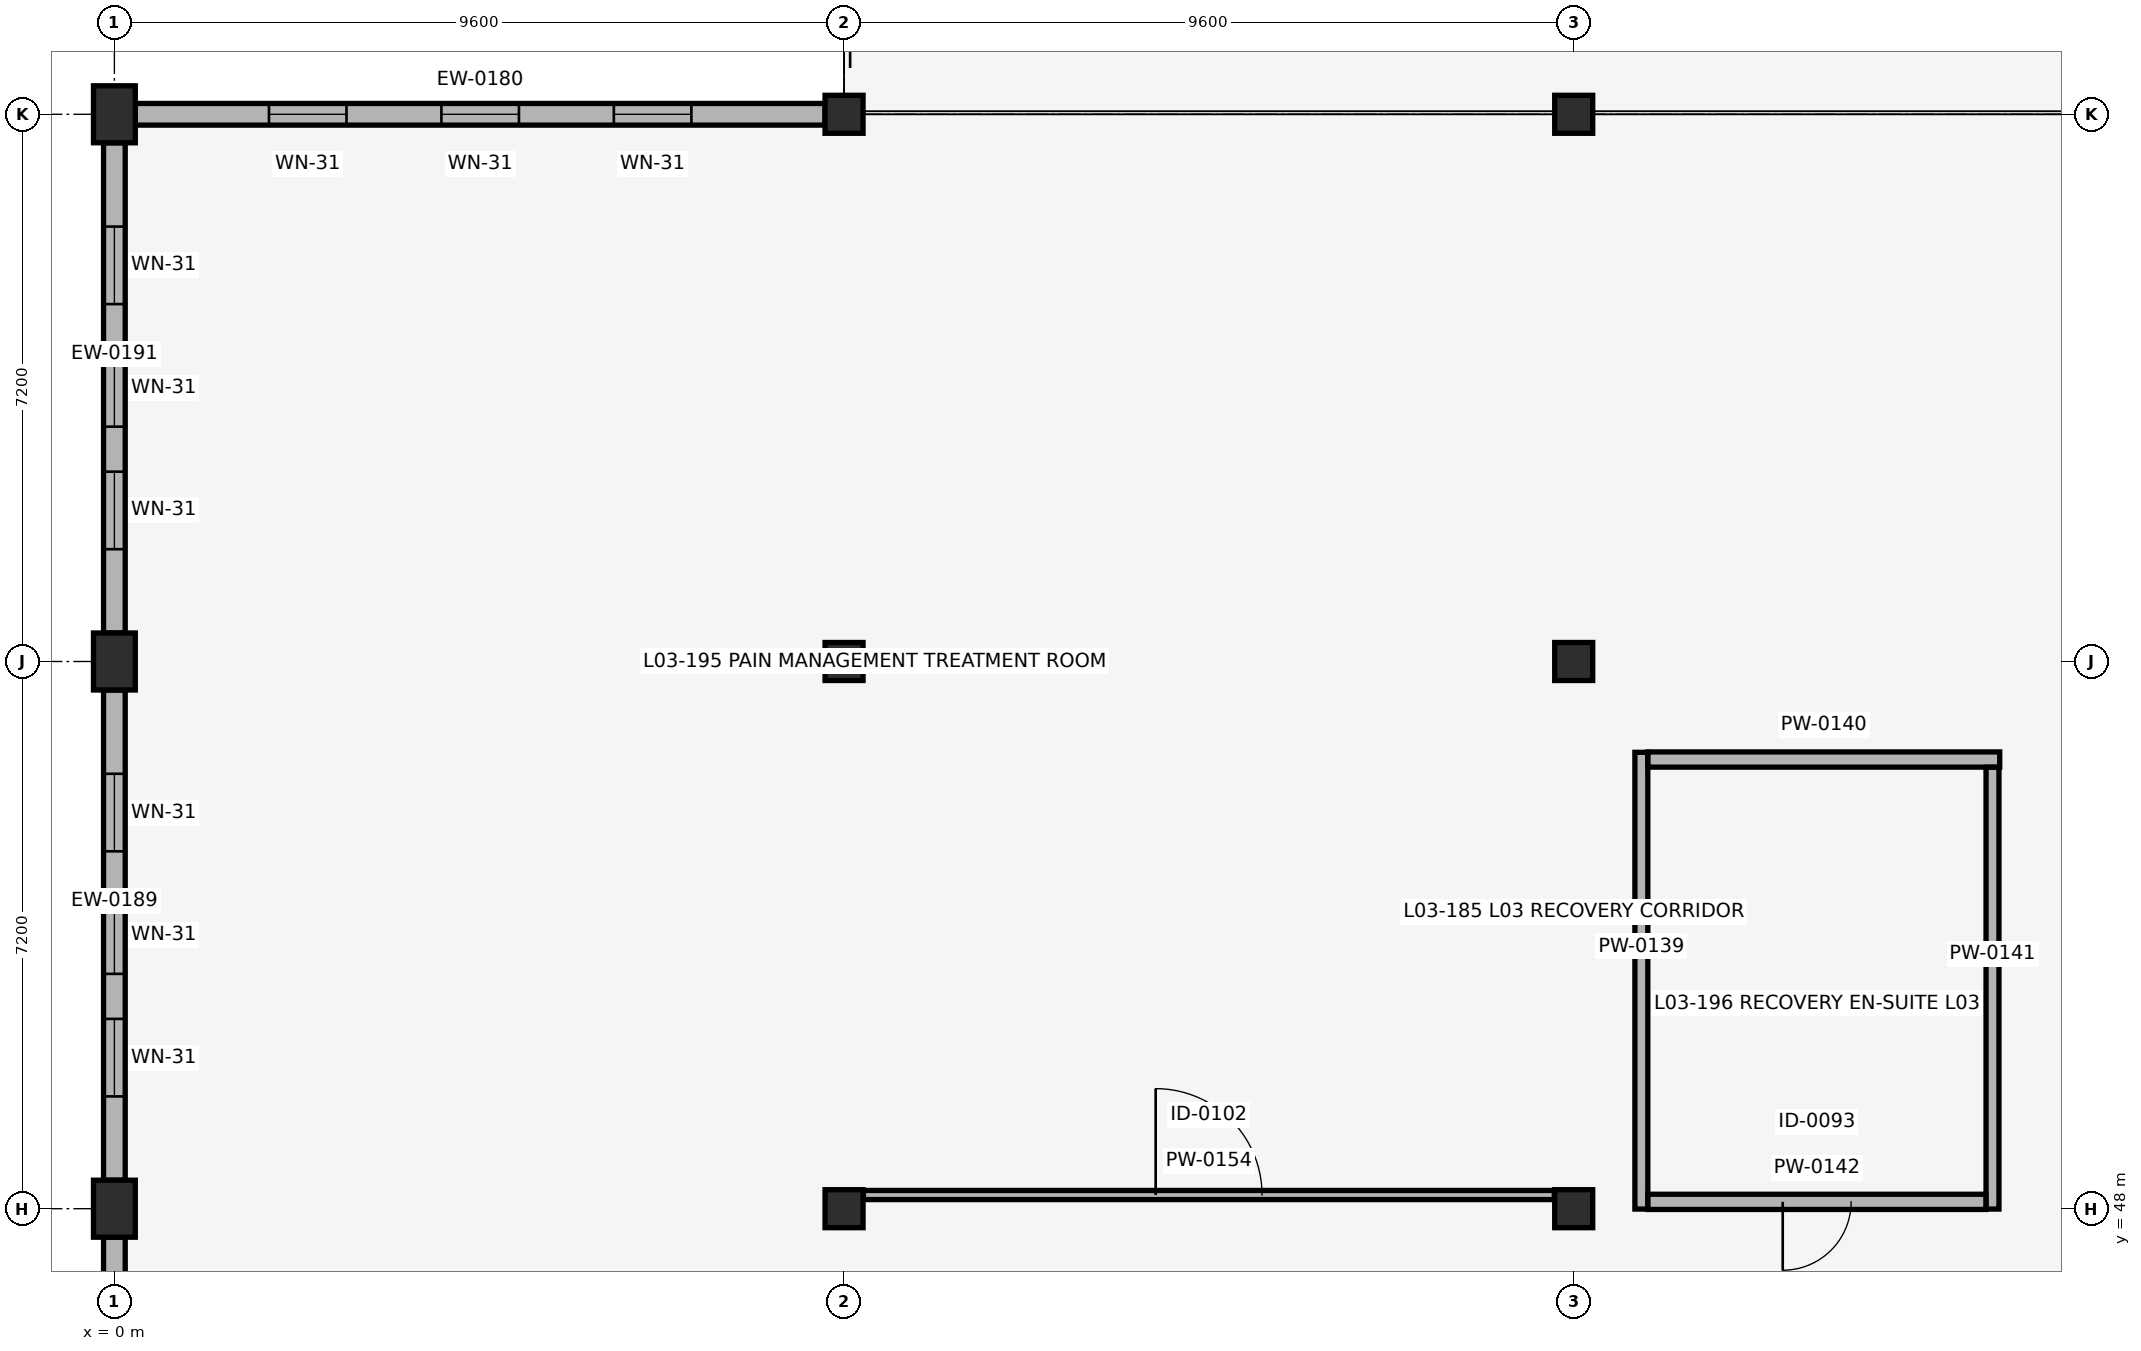
"""IFC4 building model, lengths in metres.
Left out: names, types, materials, properties, quantities, classifications, styles, units other than length and angle.
Written with IfcOpenShell. Run it as: python <this file> out.ifc"""

import sys

from ifc_helpers import new_model, si_unit, direction, frame, frame_2d, origin, origin_2d, place, context, subcontext, project, spatial, rectangle, extrude, element, fill, save


model = new_model("IFC4")
c1 = context("Model", 3, precision=1e-05, world=origin(), true_north=direction((0.0, 1.0)))
c2 = subcontext(c1, "Body", "Model", "MODEL_VIEW")
j1 = project(units=[si_unit("LENGTHUNIT", "METRE"), si_unit("PLANEANGLEUNIT", "RADIAN")], contexts=[c1])
p1 = place(None, origin())
s1 = spatial("IfcSite", under=j1, at=p1, CompositionType="ELEMENT")
p2 = place(p1, origin())
s2 = spatial("IfcBuilding", under=s1, at=p2, CompositionType="ELEMENT")
p3 = place(p2, frame((0.0, 0.0, 12.58)))
s3 = spatial("IfcBuildingStorey", under=s2, at=p3, CompositionType="ELEMENT", Elevation=12.58)
for number, where, z_axis, x_axis in (
    (1, (0.0, 48.0, 0.0), (0.0, 0.0, 1.0), (1.0, 0.0, 0.0)),
    (2, (0.0, 55.2, 0.0), (0.0, 0.0, 1.0), (1.0, 0.0, 0.0)),
    (3, (0.0, 62.4, 0.0), (0.0, 0.0, 1.0), (1.0, 0.0, 0.0)),
):
    element("IfcColumn", number, at=place(p3, frame(where, z_axis=z_axis, x_axis=x_axis)), inside=s3, PredefinedType="COLUMN", context=c2, shape_type="SweptSolid", body=[
        extrude(rectangle(XDim=0.55, YDim=0.75, at=origin_2d()), origin(), (0.0, 0.0, 1.0), 4.08),
    ])
for number, where, z_axis, x_axis in (
    (4, (9.6, 48.0, 0.0), (0.0, 0.0, 1.0), (1.0, 0.0, 0.0)),
    (5, (9.6, 55.2, 0.0), (0.0, 0.0, 1.0), (1.0, 0.0, 0.0)),
    (6, (9.6, 62.4, 0.0), (0.0, 0.0, 1.0), (1.0, 0.0, 0.0)),
    (7, (19.2, 48.0, 0.0), (0.0, 0.0, 1.0), (1.0, 0.0, 0.0)),
    (8, (19.2, 55.2, 0.0), (0.0, 0.0, 1.0), (1.0, 0.0, 0.0)),
    (9, (19.2, 62.4, 0.0), (0.0, 0.0, 1.0), (1.0, 0.0, 0.0)),
):
    element("IfcColumn", number, at=place(p3, frame(where, z_axis=z_axis, x_axis=x_axis)), inside=s3, PredefinedType="COLUMN", context=c2, shape_type="SweptSolid", body=[
        extrude(rectangle(XDim=0.5, YDim=0.5, at=origin_2d()), origin(), (0.0, 0.0, 1.0), 4.08),
    ])
p4 = place(p3, frame((9.35, 62.4, 0.0), z_axis=(0.0, 0.0, 1.0), x_axis=(-1.0, 0.0, 0.0)))
e10 = element("IfcWall", 10, at=p4, inside=s3, PredefinedType="SOLIDWALL", context=c2, shape_type="SweptSolid", body=[
    extrude(rectangle(XDim=9.075, YDim=0.285, at=frame_2d((4.538, 0.0))), origin(), (0.0, 0.0, 1.0), 3.06),
])
p5 = place(p4, frame((1.759, 0.0, 0.88)))
e11 = element("IfcOpeningElement", 11, at=p5, cuts=e10, PredefinedType="OPENING", context=c2, shape_type="SweptSolid", body=[
    extrude(rectangle(XDim=1.02, YDim=1.88, at=frame_2d((0.51, 0.94))), frame((0.0, 0.152, 0.0), z_axis=(0.0, -1.0, 0.0), x_axis=(1.0, 0.0, 0.0)), (0.0, 0.0, 1.0), 0.305),
])
p6 = place(p4, frame((4.028, 0.0, 0.88)))
e12 = element("IfcOpeningElement", 12, at=p6, cuts=e10, PredefinedType="OPENING", context=c2, shape_type="SweptSolid", body=[
    extrude(rectangle(XDim=1.02, YDim=1.88, at=frame_2d((0.51, 0.94))), frame((0.0, 0.152, 0.0), z_axis=(0.0, -1.0, 0.0), x_axis=(1.0, 0.0, 0.0)), (0.0, 0.0, 1.0), 0.305),
])
p7 = place(p4, frame((6.296, 0.0, 0.88)))
e13 = element("IfcOpeningElement", 13, at=p7, cuts=e10, PredefinedType="OPENING", context=c2, shape_type="SweptSolid", body=[
    extrude(rectangle(XDim=1.02, YDim=1.88, at=frame_2d((0.51, 0.94))), frame((0.0, 0.152, 0.0), z_axis=(0.0, -1.0, 0.0), x_axis=(1.0, 0.0, 0.0)), (0.0, 0.0, 1.0), 0.305),
])
p8 = place(p3, frame((0.0, 47.625, 0.0), z_axis=(0.0, 0.0, 1.0), x_axis=(0.0, -1.0, 0.0)))
e14 = element("IfcWall", 14, at=p8, inside=s3, PredefinedType="SOLIDWALL", context=c2, shape_type="SweptSolid", body=[
    extrude(rectangle(XDim=6.45, YDim=0.285, at=frame_2d((3.225, 0.0))), origin(), (0.0, 0.0, 1.0), 3.06),
])
p9 = place(p8, frame((1.103, 0.0, 0.88)))
e15 = element("IfcOpeningElement", 15, at=p9, cuts=e14, PredefinedType="OPENING", context=c2, shape_type="SweptSolid", body=[
    extrude(rectangle(XDim=1.02, YDim=1.88, at=frame_2d((0.51, 0.94))), frame((0.0, 0.152, 0.0), z_axis=(0.0, -1.0, 0.0), x_axis=(1.0, 0.0, 0.0)), (0.0, 0.0, 1.0), 0.305),
])
p10 = place(p8, frame((2.715, 0.0, 0.88)))
e16 = element("IfcOpeningElement", 16, at=p10, cuts=e14, PredefinedType="OPENING", context=c2, shape_type="SweptSolid", body=[
    extrude(rectangle(XDim=1.02, YDim=1.88, at=frame_2d((0.51, 0.94))), frame((0.0, 0.152, 0.0), z_axis=(0.0, -1.0, 0.0), x_axis=(1.0, 0.0, 0.0)), (0.0, 0.0, 1.0), 0.305),
])
p11 = place(p8, frame((4.327, 0.0, 0.88)))
e17 = element("IfcOpeningElement", 17, at=p11, cuts=e14, PredefinedType="OPENING", context=c2, shape_type="SweptSolid", body=[
    extrude(rectangle(XDim=1.02, YDim=1.88, at=frame_2d((0.51, 0.94))), frame((0.0, 0.152, 0.0), z_axis=(0.0, -1.0, 0.0), x_axis=(1.0, 0.0, 0.0)), (0.0, 0.0, 1.0), 0.305),
])
p12 = place(p3, frame((0.0, 54.825, 0.0), z_axis=(0.0, 0.0, 1.0), x_axis=(0.0, -1.0, 0.0)))
e18 = element("IfcWall", 18, at=p12, inside=s3, PredefinedType="SOLIDWALL", context=c2, shape_type="SweptSolid", body=[
    extrude(rectangle(XDim=6.45, YDim=0.285, at=frame_2d((3.225, 0.0))), origin(), (0.0, 0.0, 1.0), 3.06),
])
p13 = place(p12, frame((1.103, 0.0, 0.88)))
e19 = element("IfcOpeningElement", 19, at=p13, cuts=e18, PredefinedType="OPENING", context=c2, shape_type="SweptSolid", body=[
    extrude(rectangle(XDim=1.02, YDim=1.88, at=frame_2d((0.51, 0.94))), frame((0.0, 0.152, 0.0), z_axis=(0.0, -1.0, 0.0), x_axis=(1.0, 0.0, 0.0)), (0.0, 0.0, 1.0), 0.305),
])
p14 = place(p12, frame((2.715, 0.0, 0.88)))
e20 = element("IfcOpeningElement", 20, at=p14, cuts=e18, PredefinedType="OPENING", context=c2, shape_type="SweptSolid", body=[
    extrude(rectangle(XDim=1.02, YDim=1.88, at=frame_2d((0.51, 0.94))), frame((0.0, 0.152, 0.0), z_axis=(0.0, -1.0, 0.0), x_axis=(1.0, 0.0, 0.0)), (0.0, 0.0, 1.0), 0.305),
])
p15 = place(p12, frame((4.327, 0.0, 0.88)))
e21 = element("IfcOpeningElement", 21, at=p15, cuts=e18, PredefinedType="OPENING", context=c2, shape_type="SweptSolid", body=[
    extrude(rectangle(XDim=1.02, YDim=1.88, at=frame_2d((0.51, 0.94))), frame((0.0, 0.152, 0.0), z_axis=(0.0, -1.0, 0.0), x_axis=(1.0, 0.0, 0.0)), (0.0, 0.0, 1.0), 0.305),
])
p16 = place(p3, frame((0.0, 62.025, 0.0), z_axis=(0.0, 0.0, 1.0), x_axis=(0.0, -1.0, 0.0)))
e22 = element("IfcWall", 22, at=p16, inside=s3, PredefinedType="SOLIDWALL", context=c2, shape_type="SweptSolid", body=[
    extrude(rectangle(XDim=6.45, YDim=0.285, at=frame_2d((3.225, 0.0))), origin(), (0.0, 0.0, 1.0), 3.06),
])
p17 = place(p16, frame((1.103, 0.0, 0.88)))
e23 = element("IfcOpeningElement", 23, at=p17, cuts=e22, PredefinedType="OPENING", context=c2, shape_type="SweptSolid", body=[
    extrude(rectangle(XDim=1.02, YDim=1.88, at=frame_2d((0.51, 0.94))), frame((0.0, 0.152, 0.0), z_axis=(0.0, -1.0, 0.0), x_axis=(1.0, 0.0, 0.0)), (0.0, 0.0, 1.0), 0.305),
])
p18 = place(p16, frame((2.715, 0.0, 0.88)))
e24 = element("IfcOpeningElement", 24, at=p18, cuts=e22, PredefinedType="OPENING", context=c2, shape_type="SweptSolid", body=[
    extrude(rectangle(XDim=1.02, YDim=1.88, at=frame_2d((0.51, 0.94))), frame((0.0, 0.152, 0.0), z_axis=(0.0, -1.0, 0.0), x_axis=(1.0, 0.0, 0.0)), (0.0, 0.0, 1.0), 0.305),
])
p19 = place(p16, frame((4.327, 0.0, 0.88)))
e25 = element("IfcOpeningElement", 25, at=p19, cuts=e22, PredefinedType="OPENING", context=c2, shape_type="SweptSolid", body=[
    extrude(rectangle(XDim=1.02, YDim=1.88, at=frame_2d((0.51, 0.94))), frame((0.0, 0.152, 0.0), z_axis=(0.0, -1.0, 0.0), x_axis=(1.0, 0.0, 0.0)), (0.0, 0.0, 1.0), 0.305),
])
p20 = place(p3, frame((20.09, 47.995, 0.0), z_axis=(0.0, 0.0, 1.0), x_axis=(0.0, 1.0, 0.0)))
e26 = element("IfcWall", 26, at=p20, inside=s3, PredefinedType="PLUMBINGWALL", context=c2, shape_type="SweptSolid", body=[
    extrude(rectangle(XDim=6.01, YDim=0.17, at=frame_2d((3.005, 0.0))), origin(), (0.0, 0.0, 1.0), 3.12),
])
p21 = place(p3, frame((20.177, 53.91, 0.0), z_axis=(0.0, 0.0, 1.0), x_axis=(1.0, 0.0, 0.0)))
e27 = element("IfcWall", 27, at=p21, inside=s3, PredefinedType="PLUMBINGWALL", context=c2, shape_type="SweptSolid", body=[
    extrude(rectangle(XDim=4.628, YDim=0.2, at=frame_2d((2.314, 0.0))), origin(), (0.0, 0.0, 1.0), 3.12),
])
p22 = place(p3, frame((24.71, 47.995, 0.0), z_axis=(0.0, 0.0, 1.0), x_axis=(0.0, 1.0, 0.0)))
e28 = element("IfcWall", 28, at=p22, inside=s3, PredefinedType="PLUMBINGWALL", context=c2, shape_type="SweptSolid", body=[
    extrude(rectangle(XDim=5.813, YDim=0.17, at=frame_2d((2.906, 0.0))), origin(), (0.0, 0.0, 1.0), 3.12),
])
p23 = place(p3, frame((20.177, 48.09, 0.0), z_axis=(0.0, 0.0, 1.0), x_axis=(1.0, 0.0, 0.0)))
e29 = element("IfcWall", 29, at=p23, inside=s3, PredefinedType="PLUMBINGWALL", context=c2, shape_type="SweptSolid", body=[
    extrude(rectangle(XDim=4.446, YDim=0.2, at=frame_2d((2.223, 0.0))), origin(), (0.0, 0.0, 1.0), 3.12),
])
p24 = place(p23, frame((1.773, 0.0, 0.0)))
e30 = element("IfcOpeningElement", 30, at=p24, cuts=e29, PredefinedType="OPENING", context=c2, shape_type="SweptSolid", body=[
    extrude(rectangle(XDim=0.9, YDim=2.06, at=frame_2d((0.45, 1.03))), frame((0.0, 0.11, 0.0), z_axis=(0.0, -1.0, 0.0), x_axis=(1.0, 0.0, 0.0)), (0.0, 0.0, 1.0), 0.22),
])
p25 = place(p3, frame((9.855, 48.18, 0.0), z_axis=(0.0, 0.0, 1.0), x_axis=(1.0, 0.0, 0.0)))
e31 = element("IfcWall", 31, at=p25, inside=s3, PredefinedType="PARTITIONING", context=c2, shape_type="SweptSolid", body=[
    extrude(rectangle(XDim=9.09, YDim=0.12, at=frame_2d((4.545, 0.0))), origin(), (0.0, 0.0, 1.0), 3.12),
])
p26 = place(p25, frame((3.845, 0.0, 0.0)))
e32 = element("IfcOpeningElement", 32, at=p26, cuts=e31, PredefinedType="OPENING", context=c2, shape_type="SweptSolid", body=[
    extrude(rectangle(XDim=1.4, YDim=2.12, at=frame_2d((0.7, 1.06))), frame((0.0, 0.07, 0.0), z_axis=(0.0, -1.0, 0.0), x_axis=(1.0, 0.0, 0.0)), (0.0, 0.0, 1.0), 0.14),
])
p27 = place(p5, origin())
e33 = element("IfcWindow", 33, at=p27, inside=s3, PartitioningType="SINGLE_PANEL", PredefinedType="WINDOW", context=c2, shape_type="SweptSolid", body=[
    extrude(rectangle(XDim=1.02, YDim=1.88, at=frame_2d((0.51, 0.94))), frame((0.0, 0.03, 0.0), z_axis=(0.0, -1.0, 0.0), x_axis=(1.0, 0.0, 0.0)), (0.0, 0.0, 1.0), 0.06),
])
fill(e11, e33)
p28 = place(p6, origin())
e34 = element("IfcWindow", 34, at=p28, inside=s3, PartitioningType="SINGLE_PANEL", PredefinedType="WINDOW", context=c2, shape_type="SweptSolid", body=[
    extrude(rectangle(XDim=1.02, YDim=1.88, at=frame_2d((0.51, 0.94))), frame((0.0, 0.03, 0.0), z_axis=(0.0, -1.0, 0.0), x_axis=(1.0, 0.0, 0.0)), (0.0, 0.0, 1.0), 0.06),
])
fill(e12, e34)
p29 = place(p7, origin())
e35 = element("IfcWindow", 35, at=p29, inside=s3, PartitioningType="SINGLE_PANEL", PredefinedType="WINDOW", context=c2, shape_type="SweptSolid", body=[
    extrude(rectangle(XDim=1.02, YDim=1.88, at=frame_2d((0.51, 0.94))), frame((0.0, 0.03, 0.0), z_axis=(0.0, -1.0, 0.0), x_axis=(1.0, 0.0, 0.0)), (0.0, 0.0, 1.0), 0.06),
])
fill(e13, e35)
p30 = place(p13, origin())
e36 = element("IfcWindow", 36, at=p30, inside=s3, PartitioningType="SINGLE_PANEL", PredefinedType="WINDOW", context=c2, shape_type="SweptSolid", body=[
    extrude(rectangle(XDim=1.02, YDim=1.88, at=frame_2d((0.51, 0.94))), frame((0.0, 0.03, 0.0), z_axis=(0.0, -1.0, 0.0), x_axis=(1.0, 0.0, 0.0)), (0.0, 0.0, 1.0), 0.06),
])
fill(e19, e36)
p31 = place(p14, origin())
e37 = element("IfcWindow", 37, at=p31, inside=s3, PartitioningType="SINGLE_PANEL", PredefinedType="WINDOW", context=c2, shape_type="SweptSolid", body=[
    extrude(rectangle(XDim=1.02, YDim=1.88, at=frame_2d((0.51, 0.94))), frame((0.0, 0.03, 0.0), z_axis=(0.0, -1.0, 0.0), x_axis=(1.0, 0.0, 0.0)), (0.0, 0.0, 1.0), 0.06),
])
fill(e20, e37)
p32 = place(p15, origin())
e38 = element("IfcWindow", 38, at=p32, inside=s3, PartitioningType="SINGLE_PANEL", PredefinedType="WINDOW", context=c2, shape_type="SweptSolid", body=[
    extrude(rectangle(XDim=1.02, YDim=1.88, at=frame_2d((0.51, 0.94))), frame((0.0, 0.03, 0.0), z_axis=(0.0, -1.0, 0.0), x_axis=(1.0, 0.0, 0.0)), (0.0, 0.0, 1.0), 0.06),
])
fill(e21, e38)
p33 = place(p17, origin())
e39 = element("IfcWindow", 39, at=p33, inside=s3, PartitioningType="SINGLE_PANEL", PredefinedType="WINDOW", context=c2, shape_type="SweptSolid", body=[
    extrude(rectangle(XDim=1.02, YDim=1.88, at=frame_2d((0.51, 0.94))), frame((0.0, 0.03, 0.0), z_axis=(0.0, -1.0, 0.0), x_axis=(1.0, 0.0, 0.0)), (0.0, 0.0, 1.0), 0.06),
])
fill(e23, e39)
p34 = place(p18, origin())
e40 = element("IfcWindow", 40, at=p34, inside=s3, PartitioningType="SINGLE_PANEL", PredefinedType="WINDOW", context=c2, shape_type="SweptSolid", body=[
    extrude(rectangle(XDim=1.02, YDim=1.88, at=frame_2d((0.51, 0.94))), frame((0.0, 0.03, 0.0), z_axis=(0.0, -1.0, 0.0), x_axis=(1.0, 0.0, 0.0)), (0.0, 0.0, 1.0), 0.06),
])
fill(e24, e40)
p35 = place(p19, origin())
e41 = element("IfcWindow", 41, at=p35, inside=s3, PartitioningType="SINGLE_PANEL", PredefinedType="WINDOW", context=c2, shape_type="SweptSolid", body=[
    extrude(rectangle(XDim=1.02, YDim=1.88, at=frame_2d((0.51, 0.94))), frame((0.0, 0.03, 0.0), z_axis=(0.0, -1.0, 0.0), x_axis=(1.0, 0.0, 0.0)), (0.0, 0.0, 1.0), 0.06),
])
fill(e25, e41)
p36 = place(p24, origin())
e42 = element("IfcDoor", 42, at=p36, inside=s3, OperationType="SINGLE_SWING_RIGHT", PredefinedType="DOOR", context=c2, shape_type="SweptSolid", body=[
    extrude(rectangle(XDim=0.9, YDim=2.06, at=frame_2d((0.45, 1.03))), frame((0.0, 0.025, 0.0), z_axis=(0.0, -1.0, 0.0), x_axis=(1.0, 0.0, 0.0)), (0.0, 0.0, 1.0), 0.05),
])
fill(e30, e42)
p37 = place(p26, origin())
e43 = element("IfcDoor", 43, at=p37, inside=s3, OperationType="SINGLE_SWING_LEFT", PredefinedType="DOOR", context=c2, shape_type="SweptSolid", body=[
    extrude(rectangle(XDim=1.4, YDim=2.12, at=frame_2d((0.7, 1.06))), frame((0.0, 0.025, 0.0), z_axis=(0.0, -1.0, 0.0), x_axis=(1.0, 0.0, 0.0)), (0.0, 0.0, 1.0), 0.05),
])
fill(e32, e43)
save(model, sys.argv[1])
